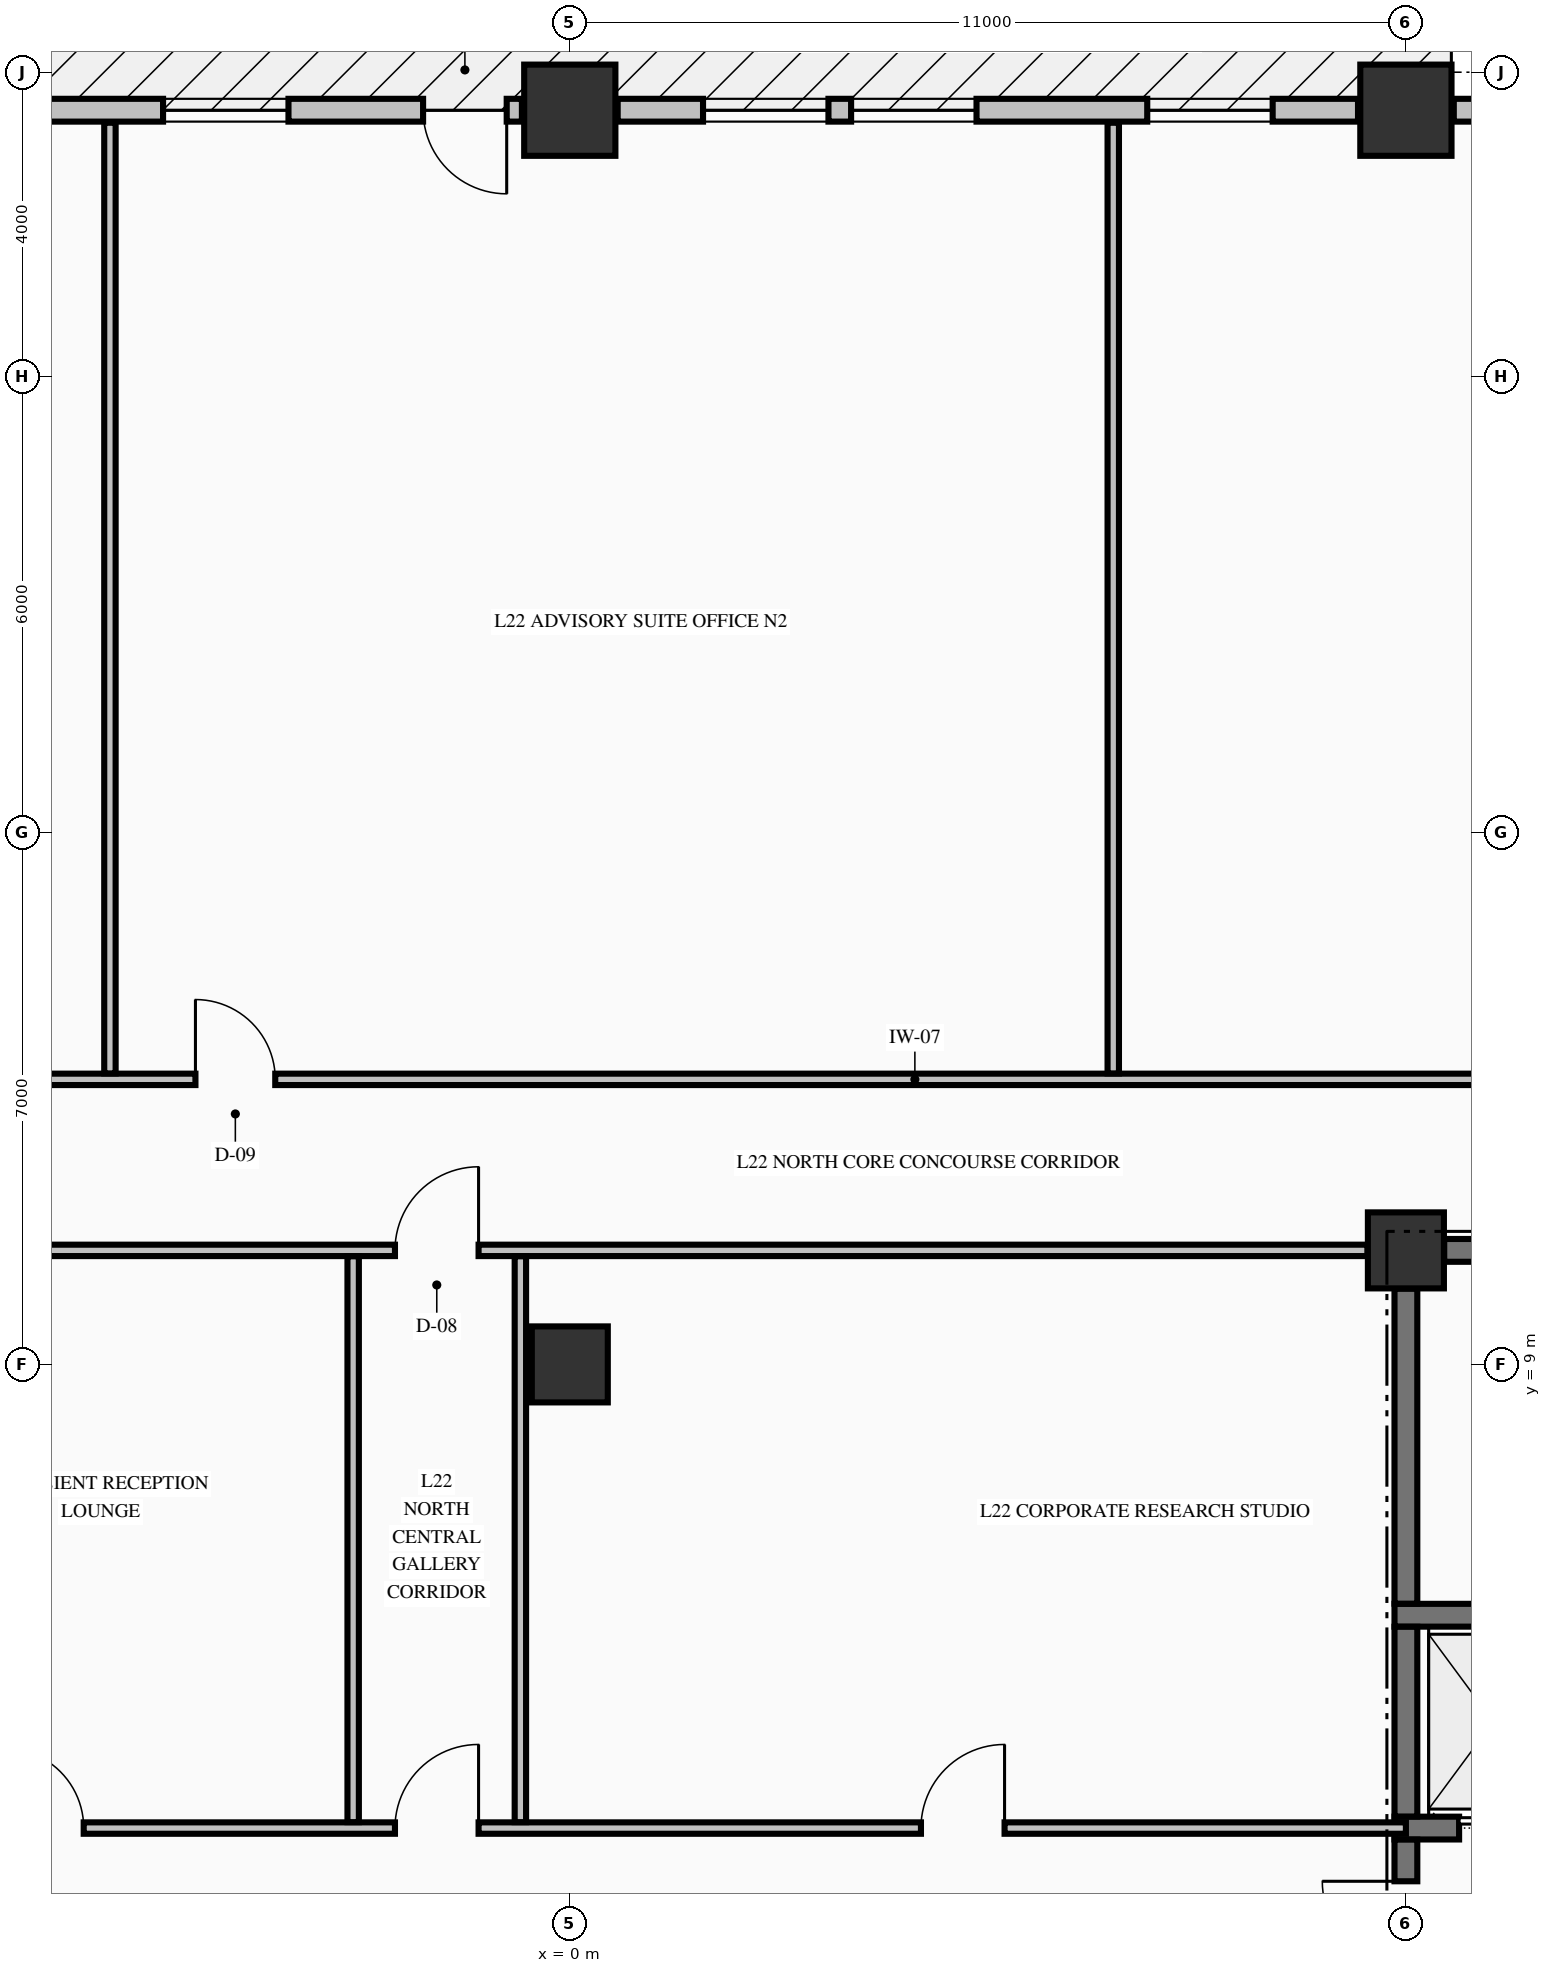
"""IFC4 building model, lengths in metres.
Left out: names, types, materials, properties, quantities, classifications, styles, units other than length and angle.
Written with IfcOpenShell. Run it as: python <this file> out.ifc"""

import sys

from ifc_helpers import new_model, si_unit, direction, frame, frame_2d, origin, origin_2d, place, context, subcontext, project, spatial, rectangle, extrude, element, fill, save


model = new_model("IFC4")
c1 = context("Model", 3, precision=1e-05, world=origin(), true_north=direction((0.0, 1.0)))
c2 = subcontext(c1, "Body", "Model", "MODEL_VIEW")
j1 = project(units=[si_unit("LENGTHUNIT", "METRE"), si_unit("PLANEANGLEUNIT", "RADIAN")], contexts=[c1])
p1 = place(None, origin())
s1 = spatial("IfcSite", under=j1, at=p1, CompositionType="ELEMENT")
p2 = place(p1, origin())
s2 = spatial("IfcBuilding", under=s1, at=p2, CompositionType="ELEMENT")
p3 = place(p2, frame((0.0, 0.0, 91.36)))
s3 = spatial("IfcBuildingStorey", under=s2, at=p3, CompositionType="ELEMENT", Elevation=91.36)
for number, where, z_axis, x_axis in (
    (1, (0.0, 25.5, -0.25), (0.0, 0.0, 1.0), (1.0, 0.0, 0.0)),
    (2, (11.0, 25.5, -0.25), (0.0, 0.0, 1.0), (1.0, 0.0, 0.0)),
):
    element("IfcColumn", number, at=place(p3, frame(where, z_axis=z_axis, x_axis=x_axis)), inside=s3, PredefinedType="COLUMN", context=c2, shape_type="SweptSolid", body=[
        extrude(rectangle(XDim=1.2, YDim=1.2, at=origin_2d()), origin(), (0.0, 0.0, 1.0), 3.57),
    ])
for number, where, z_axis, x_axis in (
    (3, (11.0, 10.5, -0.25), (0.0, 0.0, 1.0), (1.0, 0.0, 0.0)),
    (4, (0.0, 9.0, -0.25), (0.0, 0.0, 1.0), (1.0, 0.0, 0.0)),
):
    element("IfcColumn", number, at=place(p3, frame(where, z_axis=z_axis, x_axis=x_axis)), inside=s3, PredefinedType="COLUMN", context=c2, shape_type="SweptSolid", body=[
        extrude(rectangle(XDim=1.0, YDim=1.0, at=origin_2d()), origin(), (0.0, 0.0, 1.0), 3.57),
    ])
p4 = place(p3, frame((-0.63, 25.5, 0.0), z_axis=(0.0, 0.0, 1.0), x_axis=(-1.0, 0.0, 0.0)))
e5 = element("IfcWall", 5, at=p4, inside=s3, PredefinedType="STANDARD", context=c2, shape_type="SweptSolid", body=[
    extrude(rectangle(XDim=9.74, YDim=0.3, at=frame_2d((4.87, 0.0))), origin(), (0.0, 0.0, 1.0), 2.712),
])
p5 = place(p4, frame((0.2, 0.0, 0.0)))
e6 = element("IfcOpeningElement", 6, at=p5, cuts=e5, PredefinedType="OPENING", context=c2, shape_type="SweptSolid", body=[
    extrude(rectangle(XDim=1.1, YDim=2.15, at=frame_2d((0.55, 1.075))), frame((0.0, 0.16, 0.0), z_axis=(0.0, -1.0, 0.0), x_axis=(1.0, 0.0, 0.0)), (0.0, 0.0, 1.0), 0.32),
])
p6 = place(p4, frame((3.071, 0.0, 0.8)))
e7 = element("IfcOpeningElement", 7, at=p6, cuts=e5, PredefinedType="OPENING", context=c2, shape_type="SweptSolid", body=[
    extrude(rectangle(XDim=1.65, YDim=1.7, at=frame_2d((0.825, 0.85))), frame((0.0, 0.16, 0.0), z_axis=(0.0, -1.0, 0.0), x_axis=(1.0, 0.0, 0.0)), (0.0, 0.0, 1.0), 0.32),
])
p7 = place(p4, frame((6.967, 0.0, 0.8)))
e8 = element("IfcOpeningElement", 8, at=p7, cuts=e5, PredefinedType="OPENING", context=c2, shape_type="SweptSolid", body=[
    extrude(rectangle(XDim=1.65, YDim=1.7, at=frame_2d((0.825, 0.85))), frame((0.0, 0.16, 0.0), z_axis=(0.0, -1.0, 0.0), x_axis=(1.0, 0.0, 0.0)), (0.0, 0.0, 1.0), 0.32),
])
p8 = place(p3, frame((10.37, 25.5, 0.0), z_axis=(0.0, 0.0, 1.0), x_axis=(-1.0, 0.0, 0.0)))
e9 = element("IfcWall", 9, at=p8, inside=s3, PredefinedType="STANDARD", context=c2, shape_type="SweptSolid", body=[
    extrude(rectangle(XDim=9.74, YDim=0.3, at=frame_2d((4.87, 0.0))), origin(), (0.0, 0.0, 1.0), 2.712),
])
p9 = place(p8, frame((1.123, 0.0, 0.8)))
e10 = element("IfcOpeningElement", 10, at=p9, cuts=e9, PredefinedType="OPENING", context=c2, shape_type="SweptSolid", body=[
    extrude(rectangle(XDim=1.65, YDim=1.7, at=frame_2d((0.825, 0.85))), frame((0.0, 0.16, 0.0), z_axis=(0.0, -1.0, 0.0), x_axis=(1.0, 0.0, 0.0)), (0.0, 0.0, 1.0), 0.32),
])
p10 = place(p8, frame((5.019, 0.0, 0.8)))
e11 = element("IfcOpeningElement", 11, at=p10, cuts=e9, PredefinedType="OPENING", context=c2, shape_type="SweptSolid", body=[
    extrude(rectangle(XDim=1.65, YDim=1.7, at=frame_2d((0.825, 0.85))), frame((0.0, 0.16, 0.0), z_axis=(0.0, -1.0, 0.0), x_axis=(1.0, 0.0, 0.0)), (0.0, 0.0, 1.0), 0.32),
])
p11 = place(p8, frame((6.967, 0.0, 0.8)))
e12 = element("IfcOpeningElement", 12, at=p11, cuts=e9, PredefinedType="OPENING", context=c2, shape_type="SweptSolid", body=[
    extrude(rectangle(XDim=1.65, YDim=1.7, at=frame_2d((0.825, 0.85))), frame((0.0, 0.16, 0.0), z_axis=(0.0, -1.0, 0.0), x_axis=(1.0, 0.0, 0.0)), (0.0, 0.0, 1.0), 0.32),
])
p12 = place(p3, frame((22.87, 25.5, 0.0), z_axis=(0.0, 0.0, 1.0), x_axis=(-1.0, 0.0, 0.0)))
e13 = element("IfcWall", 13, at=p12, inside=s3, PredefinedType="STANDARD", context=c2, shape_type="SweptSolid", body=[
    extrude(rectangle(XDim=11.24, YDim=0.3, at=frame_2d((5.62, 0.0))), origin(), (0.0, 0.0, 1.0), 2.712),
])
p13 = place(p3, frame((10.85, 2.9, 0.0), z_axis=(0.0, 0.0, 1.0), x_axis=(1.0, 0.0, 0.0)))
e14 = element("IfcWall", 14, at=p13, inside=s3, PredefinedType="SHEAR", context=c2, shape_type="SweptSolid", body=[
    extrude(rectangle(XDim=4.025, YDim=0.3, at=frame_2d((2.012, 0.0))), origin(), (0.0, 0.0, 1.0), 3.32),
])
p14 = place(p13, frame((0.85, 0.0, 0.0)))
e15 = element("IfcOpeningElement", 15, at=p14, cuts=e14, PredefinedType="OPENING", context=c2, shape_type="SweptSolid", body=[
    extrude(rectangle(XDim=1.1, YDim=2.2, at=frame_2d((0.55, 1.1))), frame((0.0, 0.16, 0.0), z_axis=(0.0, -1.0, 0.0), x_axis=(1.0, 0.0, 0.0)), (0.0, 0.0, 1.0), 0.32),
])
p15 = place(p3, frame((10.85, 5.7, 0.0), z_axis=(0.0, 0.0, 1.0), x_axis=(1.0, 0.0, 0.0)))
e16 = element("IfcWall", 16, at=p15, inside=s3, PredefinedType="SHEAR", context=c2, shape_type="SweptSolid", body=[
    extrude(rectangle(XDim=4.025, YDim=0.3, at=frame_2d((2.012, 0.0))), origin(), (0.0, 0.0, 1.0), 3.32),
])
p16 = place(p3, frame((11.504, 10.5, 0.0), z_axis=(0.0, 0.0, 1.0), x_axis=(1.0, 0.0, 0.0)))
e17 = element("IfcWall", 17, at=p16, inside=s3, PredefinedType="SHEAR", context=c2, shape_type="SweptSolid", body=[
    extrude(rectangle(XDim=3.196, YDim=0.3, at=frame_2d((1.598, 0.0))), origin(), (0.0, 0.0, 1.0), 3.32),
])
p17 = place(p16, frame((1.471, 0.0, 0.0)))
e18 = element("IfcOpeningElement", 18, at=p17, cuts=e17, PredefinedType="OPENING", context=c2, shape_type="SweptSolid", body=[
    extrude(rectangle(XDim=0.95, YDim=2.15, at=frame_2d((0.475, 1.075))), frame((0.0, 0.16, 0.0), z_axis=(0.0, -1.0, 0.0), x_axis=(1.0, 0.0, 0.0)), (0.0, 0.0, 1.0), 0.32),
])
p18 = place(p3, frame((-11.0, 2.9, 0.0), z_axis=(0.0, 0.0, 1.0), x_axis=(1.0, 0.0, 0.0)))
e19 = element("IfcWall", 19, at=p18, inside=s3, PredefinedType="PARTITIONING", context=c2, shape_type="SweptSolid", body=[
    extrude(rectangle(XDim=22.0, YDim=0.15, at=frame_2d((11.0, 0.0))), origin(), (0.0, 0.0, 1.0), 3.32),
])
p19 = place(p18, frame((8.7, 0.0, 0.0)))
e20 = element("IfcOpeningElement", 20, at=p19, cuts=e19, PredefinedType="OPENING", context=c2, shape_type="SweptSolid", body=[
    extrude(rectangle(XDim=1.1, YDim=2.15, at=frame_2d((0.55, 1.075))), frame((0.0, 0.085, 0.0), z_axis=(0.0, -1.0, 0.0), x_axis=(1.0, 0.0, 0.0)), (0.0, 0.0, 1.0), 0.17),
])
p20 = place(p18, frame((3.555, 0.0, 0.0)))
e21 = element("IfcOpeningElement", 21, at=p20, cuts=e19, PredefinedType="OPENING", context=c2, shape_type="SweptSolid", body=[
    extrude(rectangle(XDim=1.05, YDim=2.15, at=frame_2d((0.525, 1.075))), frame((0.0, 0.085, 0.0), z_axis=(0.0, -1.0, 0.0), x_axis=(1.0, 0.0, 0.0)), (0.0, 0.0, 1.0), 0.17),
])
p21 = place(p18, frame((15.62, 0.0, 0.0)))
e22 = element("IfcOpeningElement", 22, at=p21, cuts=e19, PredefinedType="OPENING", context=c2, shape_type="SweptSolid", body=[
    extrude(rectangle(XDim=1.1, YDim=2.15, at=frame_2d((0.55, 1.075))), frame((0.0, 0.085, 0.0), z_axis=(0.0, -1.0, 0.0), x_axis=(1.0, 0.0, 0.0)), (0.0, 0.0, 1.0), 0.17),
])
p22 = place(p3, frame((-10.494, 10.5, 0.0), z_axis=(0.0, 0.0, 1.0), x_axis=(1.0, 0.0, 0.0)))
e23 = element("IfcWall", 23, at=p22, inside=s3, PredefinedType="PARTITIONING", context=c2, shape_type="SweptSolid", body=[
    extrude(rectangle(XDim=20.988, YDim=0.15, at=frame_2d((10.494, 0.0))), origin(), (0.0, 0.0, 1.0), 3.32),
])
p23 = place(p22, frame((8.194, 0.0, 0.0)))
e24 = element("IfcOpeningElement", 24, at=p23, cuts=e23, PredefinedType="OPENING", context=c2, shape_type="SweptSolid", body=[
    extrude(rectangle(XDim=1.1, YDim=2.15, at=frame_2d((0.55, 1.075))), frame((0.0, 0.085, 0.0), z_axis=(0.0, -1.0, 0.0), x_axis=(1.0, 0.0, 0.0)), (0.0, 0.0, 1.0), 0.17),
])
p24 = place(p3, frame((-22.835, 12.75, 0.0), z_axis=(0.0, 0.0, 1.0), x_axis=(1.0, 0.0, 0.0)))
e25 = element("IfcWall", 25, at=p24, inside=s3, PredefinedType="PARTITIONING", context=c2, shape_type="SweptSolid", body=[
    extrude(rectangle(XDim=50.67, YDim=0.15, at=frame_2d((25.335, 0.0))), origin(), (0.0, 0.0, 1.0), 3.32),
])
p25 = place(p24, frame((14.61, 0.0, 0.0)))
e26 = element("IfcOpeningElement", 26, at=p25, cuts=e25, PredefinedType="OPENING", context=c2, shape_type="SweptSolid", body=[
    extrude(rectangle(XDim=1.05, YDim=2.15, at=frame_2d((0.525, 1.075))), frame((0.0, 0.085, 0.0), z_axis=(0.0, -1.0, 0.0), x_axis=(1.0, 0.0, 0.0)), (0.0, 0.0, 1.0), 0.17),
])
p26 = place(p24, frame((17.91, 0.0, 0.0)))
e27 = element("IfcOpeningElement", 27, at=p26, cuts=e25, PredefinedType="OPENING", context=c2, shape_type="SweptSolid", body=[
    extrude(rectangle(XDim=1.05, YDim=2.15, at=frame_2d((0.525, 1.075))), frame((0.0, 0.085, 0.0), z_axis=(0.0, -1.0, 0.0), x_axis=(1.0, 0.0, 0.0)), (0.0, 0.0, 1.0), 0.17),
])
p27 = place(p24, frame((35.79, 0.0, 0.0)))
e28 = element("IfcOpeningElement", 28, at=p27, cuts=e25, PredefinedType="OPENING", context=c2, shape_type="SweptSolid", body=[
    extrude(rectangle(XDim=1.05, YDim=2.15, at=frame_2d((0.525, 1.075))), frame((0.0, 0.085, 0.0), z_axis=(0.0, -1.0, 0.0), x_axis=(1.0, 0.0, 0.0)), (0.0, 0.0, 1.0), 0.17),
])
p28 = place(p3, frame((11.0, 0.504, 0.0), z_axis=(0.0, 0.0, 1.0), x_axis=(0.0, 1.0, 0.0)))
e29 = element("IfcWall", 29, at=p28, inside=s3, PredefinedType="SHEAR", context=c2, shape_type="SweptSolid", body=[
    extrude(rectangle(XDim=2.244, YDim=0.3, at=frame_2d((1.122, 0.0))), origin(), (0.0, 0.0, 1.0), 3.32),
])
p29 = place(p28, frame((0.596, 0.0, 0.0)))
e30 = element("IfcOpeningElement", 30, at=p29, cuts=e29, PredefinedType="OPENING", context=c2, shape_type="SweptSolid", body=[
    extrude(rectangle(XDim=1.1, YDim=2.15, at=frame_2d((0.55, 1.075))), frame((0.0, 0.16, 0.0), z_axis=(0.0, -1.0, 0.0), x_axis=(1.0, 0.0, 0.0)), (0.0, 0.0, 1.0), 0.32),
])
p30 = place(p3, frame((11.0, 3.052, 0.0), z_axis=(0.0, 0.0, 1.0), x_axis=(0.0, 1.0, 0.0)))
e31 = element("IfcWall", 31, at=p30, inside=s3, PredefinedType="SHEAR", context=c2, shape_type="SweptSolid", body=[
    extrude(rectangle(XDim=2.496, YDim=0.3, at=frame_2d((1.248, 0.0))), origin(), (0.0, 0.0, 1.0), 3.32),
])
p31 = place(p3, frame((11.0, 5.852, 0.0), z_axis=(0.0, 0.0, 1.0), x_axis=(0.0, 1.0, 0.0)))
e32 = element("IfcWall", 32, at=p31, inside=s3, PredefinedType="SHEAR", context=c2, shape_type="SweptSolid", body=[
    extrude(rectangle(XDim=4.144, YDim=0.3, at=frame_2d((2.072, 0.0))), origin(), (0.0, 0.0, 1.0), 3.32),
])
p32 = place(p3, frame((-6.05, 12.828, 0.0), z_axis=(0.0, 0.0, 1.0), x_axis=(0.0, 1.0, 0.0)))
e33 = element("IfcWall", 33, at=p32, inside=s3, PredefinedType="PARTITIONING", context=c2, shape_type="SweptSolid", body=[
    extrude(rectangle(XDim=12.507, YDim=0.15, at=frame_2d((6.253, 0.0))), origin(), (0.0, 0.0, 1.0), 3.32),
])
for number, where, z_axis, x_axis in (
    (34, (-2.85, 2.978, 0.0), (0.0, 0.0, 1.0), (0.0, 1.0, 0.0)),
    (35, (-0.65, 2.978, 0.0), (0.0, 0.0, 1.0), (0.0, 1.0, 0.0)),
):
    element("IfcWall", number, at=place(p3, frame(where, z_axis=z_axis, x_axis=x_axis)), inside=s3, PredefinedType="PARTITIONING", context=c2, shape_type="SweptSolid", body=[
        extrude(rectangle(XDim=7.444, YDim=0.15, at=frame_2d((3.722, 0.0))), origin(), (0.0, 0.0, 1.0), 3.32),
    ])
p33 = place(p3, frame((7.15, 12.828, 0.0), z_axis=(0.0, 0.0, 1.0), x_axis=(0.0, 1.0, 0.0)))
e36 = element("IfcWall", 36, at=p33, inside=s3, PredefinedType="PARTITIONING", context=c2, shape_type="SweptSolid", body=[
    extrude(rectangle(XDim=12.507, YDim=0.15, at=frame_2d((6.253, 0.0))), origin(), (0.0, 0.0, 1.0), 3.32),
])
p34 = place(p5, origin())
e37 = element("IfcDoor", 37, at=p34, inside=s3, OperationType="SINGLE_SWING_LEFT", PredefinedType="DOOR", context=c2, shape_type="SweptSolid", body=[
    extrude(rectangle(XDim=1.1, YDim=2.15, at=frame_2d((0.55, 1.075))), frame((0.0, 0.025, 0.0), z_axis=(0.0, -1.0, 0.0), x_axis=(1.0, 0.0, 0.0)), (0.0, 0.0, 1.0), 0.05),
])
fill(e6, e37)
p35 = place(p6, origin())
e38 = element("IfcWindow", 38, at=p35, inside=s3, PartitioningType="SINGLE_PANEL", PredefinedType="WINDOW", context=c2, shape_type="SweptSolid", body=[
    extrude(rectangle(XDim=1.65, YDim=1.7, at=frame_2d((0.825, 0.85))), frame((0.0, 0.03, 0.0), z_axis=(0.0, -1.0, 0.0), x_axis=(1.0, 0.0, 0.0)), (0.0, 0.0, 1.0), 0.06),
])
fill(e7, e38)
p36 = place(p9, origin())
e39 = element("IfcWindow", 39, at=p36, inside=s3, PartitioningType="SINGLE_PANEL", PredefinedType="WINDOW", context=c2, shape_type="SweptSolid", body=[
    extrude(rectangle(XDim=1.65, YDim=1.7, at=frame_2d((0.825, 0.85))), frame((0.0, 0.03, 0.0), z_axis=(0.0, -1.0, 0.0), x_axis=(1.0, 0.0, 0.0)), (0.0, 0.0, 1.0), 0.06),
])
fill(e10, e39)
p37 = place(p10, origin())
e40 = element("IfcWindow", 40, at=p37, inside=s3, PartitioningType="SINGLE_PANEL", PredefinedType="WINDOW", context=c2, shape_type="SweptSolid", body=[
    extrude(rectangle(XDim=1.65, YDim=1.7, at=frame_2d((0.825, 0.85))), frame((0.0, 0.03, 0.0), z_axis=(0.0, -1.0, 0.0), x_axis=(1.0, 0.0, 0.0)), (0.0, 0.0, 1.0), 0.06),
])
fill(e11, e40)
p38 = place(p11, origin())
e41 = element("IfcWindow", 41, at=p38, inside=s3, PartitioningType="SINGLE_PANEL", PredefinedType="WINDOW", context=c2, shape_type="SweptSolid", body=[
    extrude(rectangle(XDim=1.65, YDim=1.7, at=frame_2d((0.825, 0.85))), frame((0.0, 0.03, 0.0), z_axis=(0.0, -1.0, 0.0), x_axis=(1.0, 0.0, 0.0)), (0.0, 0.0, 1.0), 0.06),
])
fill(e12, e41)
p39 = place(p29, origin())
e42 = element("IfcDoor", 42, at=p39, inside=s3, OperationType="SINGLE_SWING_RIGHT", PredefinedType="DOOR", context=c2, shape_type="SweptSolid", body=[
    extrude(rectangle(XDim=1.1, YDim=2.15, at=frame_2d((0.55, 1.075))), frame((0.0, 0.025, 0.0), z_axis=(0.0, -1.0, 0.0), x_axis=(1.0, 0.0, 0.0)), (0.0, 0.0, 1.0), 0.05),
])
fill(e30, e42)
p40 = place(p14, origin())
e43 = element("IfcDoor", 43, at=p40, inside=s3, OperationType="SLIDING_TO_RIGHT", PredefinedType="DOOR", context=c2, shape_type="SweptSolid", body=[
    extrude(rectangle(XDim=1.1, YDim=2.2, at=frame_2d((0.55, 1.1))), frame((0.0, 0.025, 0.0), z_axis=(0.0, -1.0, 0.0), x_axis=(1.0, 0.0, 0.0)), (0.0, 0.0, 1.0), 0.05),
])
fill(e15, e43)
p41 = place(p23, origin())
e44 = element("IfcDoor", 44, at=p41, inside=s3, OperationType="SINGLE_SWING_RIGHT", PredefinedType="DOOR", context=c2, shape_type="SweptSolid", body=[
    extrude(rectangle(XDim=1.1, YDim=2.15, at=frame_2d((0.55, 1.075))), frame((0.0, 0.025, 0.0), z_axis=(0.0, -1.0, 0.0), x_axis=(1.0, 0.0, 0.0)), (0.0, 0.0, 1.0), 0.05),
])
fill(e24, e44)
p42 = place(p19, origin())
e45 = element("IfcDoor", 45, at=p42, inside=s3, OperationType="SINGLE_SWING_RIGHT", PredefinedType="DOOR", context=c2, shape_type="SweptSolid", body=[
    extrude(rectangle(XDim=1.1, YDim=2.15, at=frame_2d((0.55, 1.075))), frame((0.0, 0.025, 0.0), z_axis=(0.0, -1.0, 0.0), x_axis=(1.0, 0.0, 0.0)), (0.0, 0.0, 1.0), 0.05),
])
fill(e20, e45)
p43 = place(p26, origin())
e46 = element("IfcDoor", 46, at=p43, inside=s3, OperationType="SINGLE_SWING_LEFT", PredefinedType="DOOR", context=c2, shape_type="SweptSolid", body=[
    extrude(rectangle(XDim=1.05, YDim=2.15, at=frame_2d((0.525, 1.075))), frame((0.0, 0.025, 0.0), z_axis=(0.0, -1.0, 0.0), x_axis=(1.0, 0.0, 0.0)), (0.0, 0.0, 1.0), 0.05),
])
fill(e27, e46)
p44 = place(p20, origin())
e47 = element("IfcDoor", 47, at=p44, inside=s3, OperationType="SINGLE_SWING_LEFT", PredefinedType="DOOR", context=c2, shape_type="SweptSolid", body=[
    extrude(rectangle(XDim=1.05, YDim=2.15, at=frame_2d((0.525, 1.075))), frame((0.0, 0.025, 0.0), z_axis=(0.0, -1.0, 0.0), x_axis=(1.0, 0.0, 0.0)), (0.0, 0.0, 1.0), 0.05),
])
fill(e21, e47)
p45 = place(p21, origin())
e48 = element("IfcDoor", 48, at=p45, inside=s3, OperationType="SINGLE_SWING_RIGHT", PredefinedType="DOOR", context=c2, shape_type="SweptSolid", body=[
    extrude(rectangle(XDim=1.1, YDim=2.15, at=frame_2d((0.55, 1.075))), frame((0.0, 0.025, 0.0), z_axis=(0.0, -1.0, 0.0), x_axis=(1.0, 0.0, 0.0)), (0.0, 0.0, 1.0), 0.05),
])
fill(e22, e48)
save(model, sys.argv[1])
